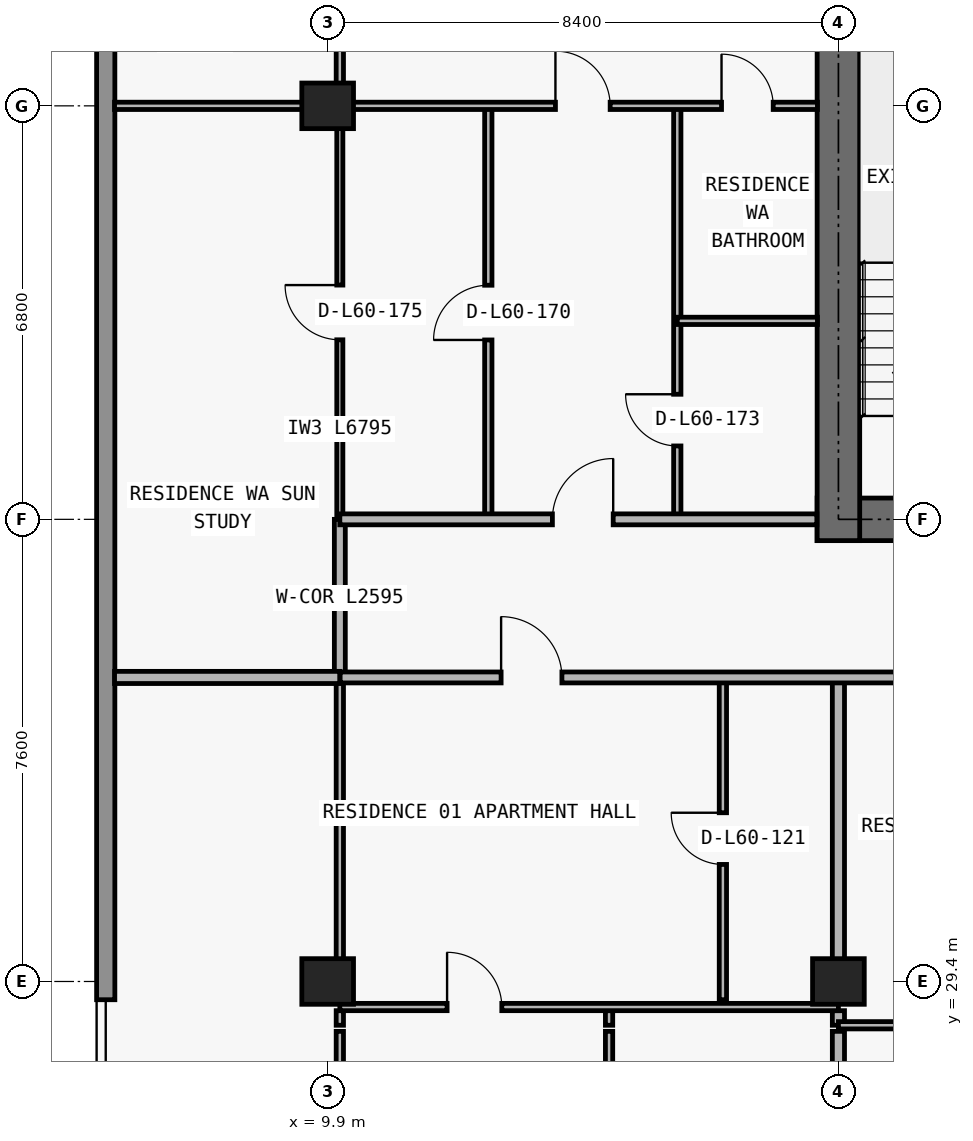
"""IFC4 building model, lengths in metres.
Left out: names, types, materials, properties, quantities, classifications, styles, units other than length and angle.
Written with IfcOpenShell. Run it as: python <this file> out.ifc"""

import sys

from ifc_helpers import new_model, si_unit, direction, frame, frame_2d, origin, origin_2d, place, context, subcontext, project, spatial, rectangle, extrude, element, fill, save


model = new_model("IFC4")
c1 = context("Model", 3, precision=1e-05, world=origin(), true_north=direction((0.0, 1.0)))
c2 = subcontext(c1, "Body", "Model", "MODEL_VIEW")
j1 = project(units=[si_unit("LENGTHUNIT", "METRE"), si_unit("PLANEANGLEUNIT", "RADIAN")], contexts=[c1])
p1 = place(None, origin())
s1 = spatial("IfcSite", under=j1, at=p1, CompositionType="ELEMENT")
p2 = place(p1, origin())
s2 = spatial("IfcBuilding", under=s1, at=p2, CompositionType="ELEMENT")
p3 = place(p2, frame((0.0, 0.0, 214.8)))
s3 = spatial("IfcBuildingStorey", under=s2, at=p3, CompositionType="ELEMENT", Elevation=214.8)
for number, where, z_axis, x_axis in (
    (1, (9.9, 29.4, 0.0), (0.0, 0.0, 1.0), (1.0, 0.0, 0.0)),
    (2, (18.3, 29.4, 0.0), (0.0, 0.0, 1.0), (1.0, 0.0, 0.0)),
    (3, (9.9, 43.8, 0.0), (0.0, 0.0, 1.0), (1.0, 0.0, 0.0)),
):
    element("IfcColumn", number, at=place(p3, frame(where, z_axis=z_axis, x_axis=x_axis)), inside=s3, PredefinedType="COLUMN", context=c2, shape_type="SweptSolid", body=[
        extrude(rectangle(XDim=0.85, YDim=0.75, at=origin_2d()), origin(), (0.0, 0.0, 1.0), 3.05),
    ])
p4 = place(p3, frame((17.95, 37.0, 0.0), z_axis=(0.0, 0.0, 1.0), x_axis=(1.0, 0.0, 0.0)))
e4 = element("IfcWall", 4, at=p4, inside=s3, PredefinedType="SHEAR", context=c2, shape_type="SweptSolid", body=[
    extrude(rectangle(XDim=41.9, YDim=0.7, at=frame_2d((20.95, 0.0))), origin(), (0.0, 0.0, 1.0), 3.05),
])
p5 = place(p4, frame((14.35, 0.0, 0.0)))
e5 = element("IfcOpeningElement", 5, at=p5, cuts=e4, PredefinedType="OPENING", context=c2, shape_type="SweptSolid", body=[
    extrude(rectangle(XDim=1.1, YDim=2.15, at=frame_2d((0.55, 1.075))), frame((0.0, 0.36, 0.0), z_axis=(0.0, -1.0, 0.0), x_axis=(1.0, 0.0, 0.0)), (0.0, 0.0, 1.0), 0.72),
])
p6 = place(p4, frame((6.2, 0.0, 0.0)))
e6 = element("IfcOpeningElement", 6, at=p6, cuts=e4, PredefinedType="OPENING", context=c2, shape_type="SweptSolid", body=[
    extrude(rectangle(XDim=1.05, YDim=2.15, at=frame_2d((0.525, 1.075))), frame((0.0, 0.36, 0.0), z_axis=(0.0, -1.0, 0.0), x_axis=(1.0, 0.0, 0.0)), (0.0, 0.0, 1.0), 0.72),
])
p7 = place(p4, frame((34.7, 0.0, 0.0)))
e7 = element("IfcOpeningElement", 7, at=p7, cuts=e4, PredefinedType="OPENING", context=c2, shape_type="SweptSolid", body=[
    extrude(rectangle(XDim=1.05, YDim=2.15, at=frame_2d((0.525, 1.075))), frame((0.0, 0.36, 0.0), z_axis=(0.0, -1.0, 0.0), x_axis=(1.0, 0.0, 0.0)), (0.0, 0.0, 1.0), 0.72),
])
p8 = place(p4, frame((10.812, 0.0, 0.0)))
e8 = element("IfcOpeningElement", 8, at=p8, cuts=e4, PredefinedType="OPENING", context=c2, shape_type="SweptSolid", body=[
    extrude(rectangle(XDim=1.05, YDim=2.15, at=frame_2d((0.525, 1.075))), frame((0.0, 0.36, 0.0), z_axis=(0.0, -1.0, 0.0), x_axis=(1.0, 0.0, 0.0)), (0.0, 0.0, 1.0), 0.72),
])
p9 = place(p4, frame((24.05, 0.0, 0.0)))
e9 = element("IfcOpeningElement", 9, at=p9, cuts=e4, PredefinedType="OPENING", context=c2, shape_type="SweptSolid", body=[
    extrude(rectangle(XDim=1.05, YDim=2.15, at=frame_2d((0.525, 1.075))), frame((0.0, 0.36, 0.0), z_axis=(0.0, -1.0, 0.0), x_axis=(1.0, 0.0, 0.0)), (0.0, 0.0, 1.0), 0.72),
])
p10 = place(p3, frame((18.3, 36.65, 0.0), z_axis=(0.0, 0.0, 1.0), x_axis=(0.0, 1.0, 0.0)))
e10 = element("IfcWall", 10, at=p10, inside=s3, PredefinedType="SHEAR", context=c2, shape_type="SweptSolid", body=[
    extrude(rectangle(XDim=13.95, YDim=0.7, at=frame_2d((6.975, 0.0))), origin(), (0.0, 0.0, 1.0), 3.05),
])
p11 = place(p3, frame((6.25, 29.1, 0.0), z_axis=(0.0, 0.0, 1.0), x_axis=(0.0, 1.0, 0.0)))
e11 = element("IfcWall", 11, at=p11, inside=s3, PredefinedType="STANDARD", context=c2, shape_type="SweptSolid", body=[
    extrude(rectangle(XDim=17.9, YDim=0.3, at=frame_2d((8.95, 0.0))), origin(), (0.0, 0.0, 1.0), 3.05),
])
p12 = place(p3, frame((10.1, 23.89, 0.0), z_axis=(0.0, 0.0, 1.0), x_axis=(0.0, 1.0, 0.0)))
e12 = element("IfcWall", 12, at=p12, inside=s3, PredefinedType="PARTITIONING", context=c2, shape_type="SweptSolid", body=[
    extrude(rectangle(XDim=4.69, YDim=0.12, at=frame_2d((2.345, 0.0))), origin(), (0.0, 0.0, 1.0), 2.263),
])
p13 = place(p12, frame((1.895, 0.0, 0.0)))
e13 = element("IfcOpeningElement", 13, at=p13, cuts=e12, PredefinedType="OPENING", context=c2, shape_type="SweptSolid", body=[
    extrude(rectangle(XDim=0.9, YDim=2.15, at=frame_2d((0.45, 1.075))), frame((0.0, 0.07, 0.0), z_axis=(0.0, -1.0, 0.0), x_axis=(1.0, 0.0, 0.0)), (0.0, 0.0, 1.0), 0.14),
])
p14 = place(p3, frame((10.1, 28.68, 0.0), z_axis=(0.0, 0.0, 1.0), x_axis=(0.0, 1.0, 0.0)))
e14 = element("IfcWall", 14, at=p14, inside=s3, PredefinedType="PARTITIONING", context=c2, shape_type="SweptSolid", body=[
    extrude(rectangle(XDim=0.24, YDim=0.12, at=frame_2d((0.12, 0.0))), origin(), (0.0, 0.0, 1.0), 2.263),
])
p15 = place(p3, frame((10.1, 29.1, 0.0), z_axis=(0.0, 0.0, 1.0), x_axis=(0.0, 1.0, 0.0)))
e15 = element("IfcWall", 15, at=p15, inside=s3, PredefinedType="PARTITIONING", context=c2, shape_type="SweptSolid", body=[
    extrude(rectangle(XDim=5.3, YDim=0.12, at=frame_2d((2.65, 0.0))), origin(), (0.0, 0.0, 1.0), 2.263),
])
p16 = place(p3, frame((10.1, 34.405, 0.0), z_axis=(0.0, 0.0, 1.0), x_axis=(0.0, 1.0, 0.0)))
e16 = element("IfcWall", 16, at=p16, inside=s3, PredefinedType="PARTITIONING", context=c2, shape_type="SweptSolid", body=[
    extrude(rectangle(XDim=2.595, YDim=0.18, at=frame_2d((1.297, 0.0))), origin(), (0.0, 0.0, 1.0), 2.263),
])
p17 = place(p3, frame((10.1, 37.005, 0.0), z_axis=(0.0, 0.0, 1.0), x_axis=(0.0, 1.0, 0.0)))
e17 = element("IfcWall", 17, at=p17, inside=s3, PredefinedType="MOVABLE", context=c2, shape_type="SweptSolid", body=[
    extrude(rectangle(XDim=6.795, YDim=0.1, at=frame_2d((3.397, 0.0))), origin(), (0.0, 0.0, 1.0), 2.263),
])
p18 = place(p17, frame((2.948, 0.0, 0.0)))
e18 = element("IfcOpeningElement", 18, at=p18, cuts=e17, PredefinedType="OPENING", context=c2, shape_type="SweptSolid", body=[
    extrude(rectangle(XDim=0.9, YDim=2.15, at=frame_2d((0.45, 1.075))), frame((0.0, 0.06, 0.0), z_axis=(0.0, -1.0, 0.0), x_axis=(1.0, 0.0, 0.0)), (0.0, 0.0, 1.0), 0.12),
])
p19 = place(p3, frame((10.1, 43.805, 0.0), z_axis=(0.0, 0.0, 1.0), x_axis=(0.0, 1.0, 0.0)))
e19 = element("IfcWall", 19, at=p19, inside=s3, PredefinedType="PARTITIONING", context=c2, shape_type="SweptSolid", body=[
    extrude(rectangle(XDim=3.075, YDim=0.12, at=frame_2d((1.538, 0.0))), origin(), (0.0, 0.0, 1.0), 3.05),
])
p20 = place(p19, frame((1.087, 0.0, 0.0)))
e20 = element("IfcOpeningElement", 20, at=p20, cuts=e19, PredefinedType="OPENING", context=c2, shape_type="SweptSolid", body=[
    extrude(rectangle(XDim=0.9, YDim=2.15, at=frame_2d((0.45, 1.075))), frame((0.0, 0.07, 0.0), z_axis=(0.0, -1.0, 0.0), x_axis=(1.0, 0.0, 0.0)), (0.0, 0.0, 1.0), 0.14),
])
p21 = place(p3, frame((12.542, 37.0, 0.0), z_axis=(0.0, 0.0, 1.0), x_axis=(0.0, 1.0, 0.0)))
e21 = element("IfcWall", 21, at=p21, inside=s3, PredefinedType="PARTITIONING", context=c2, shape_type="SweptSolid", body=[
    extrude(rectangle(XDim=6.8, YDim=0.12, at=frame_2d((3.4, 0.0))), origin(), (0.0, 0.0, 1.0), 2.578),
])
p22 = place(p21, frame((2.95, 0.0, 0.0)))
e22 = element("IfcOpeningElement", 22, at=p22, cuts=e21, PredefinedType="OPENING", context=c2, shape_type="SweptSolid", body=[
    extrude(rectangle(XDim=0.9, YDim=2.15, at=frame_2d((0.45, 1.075))), frame((0.0, 0.07, 0.0), z_axis=(0.0, -1.0, 0.0), x_axis=(1.0, 0.0, 0.0)), (0.0, 0.0, 1.0), 0.14),
])
p23 = place(p3, frame((14.528, 23.89, 0.0), z_axis=(0.0, 0.0, 1.0), x_axis=(0.0, 1.0, 0.0)))
e23 = element("IfcWall", 23, at=p23, inside=s3, PredefinedType="PARTITIONING", context=c2, shape_type="SweptSolid", body=[
    extrude(rectangle(XDim=4.69, YDim=0.12, at=frame_2d((2.345, 0.0))), origin(), (0.0, 0.0, 1.0), 3.05),
])
p24 = place(p23, frame((1.895, 0.0, 0.0)))
e24 = element("IfcOpeningElement", 24, at=p24, cuts=e23, PredefinedType="OPENING", context=c2, shape_type="SweptSolid", body=[
    extrude(rectangle(XDim=0.9, YDim=2.15, at=frame_2d((0.45, 1.075))), frame((0.0, 0.07, 0.0), z_axis=(0.0, -1.0, 0.0), x_axis=(1.0, 0.0, 0.0)), (0.0, 0.0, 1.0), 0.14),
])
p25 = place(p3, frame((14.528, 28.68, 0.0), z_axis=(0.0, 0.0, 1.0), x_axis=(0.0, 1.0, 0.0)))
e25 = element("IfcWall", 25, at=p25, inside=s3, PredefinedType="PARTITIONING", context=c2, shape_type="SweptSolid", body=[
    extrude(rectangle(XDim=0.24, YDim=0.12, at=frame_2d((0.12, 0.0))), origin(), (0.0, 0.0, 1.0), 3.05),
])
p26 = place(p3, frame((15.65, 37.0, 0.0), z_axis=(0.0, 0.0, 1.0), x_axis=(0.0, 1.0, 0.0)))
e26 = element("IfcWall", 26, at=p26, inside=s3, PredefinedType="PARTITIONING", context=c2, shape_type="SweptSolid", body=[
    extrude(rectangle(XDim=6.8, YDim=0.12, at=frame_2d((3.4, 0.0))), origin(), (0.0, 0.0, 1.0), 2.679),
])
p27 = place(p26, frame((1.207, 0.0, 0.0)))
e27 = element("IfcOpeningElement", 27, at=p27, cuts=e26, PredefinedType="OPENING", context=c2, shape_type="SweptSolid", body=[
    extrude(rectangle(XDim=0.85, YDim=2.1, at=frame_2d((0.425, 1.05))), frame((0.0, 0.07, 0.0), z_axis=(0.0, -1.0, 0.0), x_axis=(1.0, 0.0, 0.0)), (0.0, 0.0, 1.0), 0.14),
])
p28 = place(p3, frame((16.4, 29.1, 0.0), z_axis=(0.0, 0.0, 1.0), x_axis=(0.0, 1.0, 0.0)))
e28 = element("IfcWall", 28, at=p28, inside=s3, PredefinedType="PARTITIONING", context=c2, shape_type="SweptSolid", body=[
    extrude(rectangle(XDim=5.3, YDim=0.12, at=frame_2d((2.65, 0.0))), origin(), (0.0, 0.0, 1.0), 3.05),
])
p29 = place(p28, frame((2.225, 0.0, 0.0)))
e29 = element("IfcOpeningElement", 29, at=p29, cuts=e28, PredefinedType="OPENING", context=c2, shape_type="SweptSolid", body=[
    extrude(rectangle(XDim=0.85, YDim=2.1, at=frame_2d((0.425, 1.05))), frame((0.0, 0.07, 0.0), z_axis=(0.0, -1.0, 0.0), x_axis=(1.0, 0.0, 0.0)), (0.0, 0.0, 1.0), 0.14),
])
p30 = place(p3, frame((18.3, 23.89, 0.0), z_axis=(0.0, 0.0, 1.0), x_axis=(0.0, 1.0, 0.0)))
e30 = element("IfcWall", 30, at=p30, inside=s3, PredefinedType="PARTITIONING", context=c2, shape_type="SweptSolid", body=[
    extrude(rectangle(XDim=4.69, YDim=0.2, at=frame_2d((2.345, 0.0))), origin(), (0.0, 0.0, 1.0), 2.263),
])
p31 = place(p3, frame((18.3, 28.68, 0.0), z_axis=(0.0, 0.0, 1.0), x_axis=(0.0, 1.0, 0.0)))
e31 = element("IfcWall", 31, at=p31, inside=s3, PredefinedType="PARTITIONING", context=c2, shape_type="SweptSolid", body=[
    extrude(rectangle(XDim=0.24, YDim=0.2, at=frame_2d((0.12, 0.0))), origin(), (0.0, 0.0, 1.0), 2.263),
])
p32 = place(p3, frame((18.3, 29.1, 0.0), z_axis=(0.0, 0.0, 1.0), x_axis=(0.0, 1.0, 0.0)))
e32 = element("IfcWall", 32, at=p32, inside=s3, PredefinedType="PARTITIONING", context=c2, shape_type="SweptSolid", body=[
    extrude(rectangle(XDim=5.3, YDim=0.2, at=frame_2d((2.65, 0.0))), origin(), (0.0, 0.0, 1.0), 2.263),
])
p33 = place(p3, frame((18.3, 28.68, 0.0), z_axis=(0.0, 0.0, 1.0), x_axis=(1.0, 0.0, 0.0)))
e33 = element("IfcWall", 33, at=p33, inside=s3, PredefinedType="PARTITIONING", context=c2, shape_type="SweptSolid", body=[
    extrude(rectangle(XDim=8.18, YDim=0.12, at=frame_2d((4.09, 0.0))), origin(), (0.0, 0.0, 1.0), 3.05),
])
p34 = place(p33, frame((1.943, 0.0, 0.0)))
e34 = element("IfcOpeningElement", 34, at=p34, cuts=e33, PredefinedType="OPENING", context=c2, shape_type="SweptSolid", body=[
    extrude(rectangle(XDim=0.9, YDim=2.15, at=frame_2d((0.45, 1.075))), frame((0.0, 0.07, 0.0), z_axis=(0.0, -1.0, 0.0), x_axis=(1.0, 0.0, 0.0)), (0.0, 0.0, 1.0), 0.14),
])
p35 = place(p3, frame((10.1, 28.98, 0.0), z_axis=(0.0, 0.0, 1.0), x_axis=(1.0, 0.0, 0.0)))
e35 = element("IfcWall", 35, at=p35, inside=s3, PredefinedType="PARTITIONING", context=c2, shape_type="SweptSolid", body=[
    extrude(rectangle(XDim=8.2, YDim=0.12, at=frame_2d((4.1, 0.0))), origin(), (0.0, 0.0, 1.0), 3.05),
])
p36 = place(p35, frame((1.764, 0.0, 0.0)))
e36 = element("IfcOpeningElement", 36, at=p36, cuts=e35, PredefinedType="OPENING", context=c2, shape_type="SweptSolid", body=[
    extrude(rectangle(XDim=0.9, YDim=2.15, at=frame_2d((0.45, 1.075))), frame((0.0, 0.07, 0.0), z_axis=(0.0, -1.0, 0.0), x_axis=(1.0, 0.0, 0.0)), (0.0, 0.0, 1.0), 0.14),
])
p37 = place(p3, frame((6.395, 34.4, 0.0), z_axis=(0.0, 0.0, 1.0), x_axis=(1.0, 0.0, 0.0)))
e37 = element("IfcWall", 37, at=p37, inside=s3, PredefinedType="PARTITIONING", context=c2, shape_type="SweptSolid", body=[
    extrude(rectangle(XDim=3.705, YDim=0.2, at=frame_2d((1.853, 0.0))), origin(), (0.0, 0.0, 1.0), 3.05),
])
p38 = place(p3, frame((10.105, 34.4, 0.0), z_axis=(0.0, 0.0, 1.0), x_axis=(1.0, 0.0, 0.0)))
e38 = element("IfcWall", 38, at=p38, inside=s3, PredefinedType="PARTITIONING", context=c2, shape_type="SweptSolid", body=[
    extrude(rectangle(XDim=29.099, YDim=0.18, at=frame_2d((14.55, 0.0))), origin(), (0.0, 0.0, 1.0), 3.05),
])
p39 = place(p38, frame((2.647, 0.0, 0.0)))
e39 = element("IfcOpeningElement", 39, at=p39, cuts=e38, PredefinedType="OPENING", context=c2, shape_type="SweptSolid", body=[
    extrude(rectangle(XDim=1.0, YDim=2.2, at=frame_2d((0.5, 1.1))), frame((0.0, 0.1, 0.0), z_axis=(0.0, -1.0, 0.0), x_axis=(1.0, 0.0, 0.0)), (0.0, 0.0, 1.0), 0.2),
])
p40 = place(p38, frame((11.056, 0.0, 0.0)))
e40 = element("IfcOpeningElement", 40, at=p40, cuts=e38, PredefinedType="OPENING", context=c2, shape_type="SweptSolid", body=[
    extrude(rectangle(XDim=1.0, YDim=2.2, at=frame_2d((0.5, 1.1))), frame((0.0, 0.1, 0.0), z_axis=(0.0, -1.0, 0.0), x_axis=(1.0, 0.0, 0.0)), (0.0, 0.0, 1.0), 0.2),
])
p41 = place(p38, frame((19.334, 0.0, 0.0)))
e41 = element("IfcOpeningElement", 41, at=p41, cuts=e38, PredefinedType="OPENING", context=c2, shape_type="SweptSolid", body=[
    extrude(rectangle(XDim=1.0, YDim=2.2, at=frame_2d((0.5, 1.1))), frame((0.0, 0.1, 0.0), z_axis=(0.0, -1.0, 0.0), x_axis=(1.0, 0.0, 0.0)), (0.0, 0.0, 1.0), 0.2),
])
p42 = place(p38, frame((26.547, 0.0, 0.0)))
e42 = element("IfcOpeningElement", 42, at=p42, cuts=e38, PredefinedType="OPENING", context=c2, shape_type="SweptSolid", body=[
    extrude(rectangle(XDim=1.0, YDim=2.2, at=frame_2d((0.5, 1.1))), frame((0.0, 0.1, 0.0), z_axis=(0.0, -1.0, 0.0), x_axis=(1.0, 0.0, 0.0)), (0.0, 0.0, 1.0), 0.2),
])
p43 = place(p3, frame((10.1, 37.0, 0.0), z_axis=(0.0, 0.0, 1.0), x_axis=(1.0, 0.0, 0.0)))
e43 = element("IfcWall", 43, at=p43, inside=s3, PredefinedType="PARTITIONING", context=c2, shape_type="SweptSolid", body=[
    extrude(rectangle(XDim=7.845, YDim=0.18, at=frame_2d((3.922, 0.0))), origin(), (0.0, 0.0, 1.0), 3.05),
])
p44 = place(p43, frame((3.496, 0.0, 0.0)))
e44 = element("IfcOpeningElement", 44, at=p44, cuts=e43, PredefinedType="OPENING", context=c2, shape_type="SweptSolid", body=[
    extrude(rectangle(XDim=1.0, YDim=2.2, at=frame_2d((0.5, 1.1))), frame((0.0, 0.1, 0.0), z_axis=(0.0, -1.0, 0.0), x_axis=(1.0, 0.0, 0.0)), (0.0, 0.0, 1.0), 0.2),
])
p45 = place(p3, frame((15.65, 40.264, 0.0), z_axis=(0.0, 0.0, 1.0), x_axis=(1.0, 0.0, 0.0)))
e45 = element("IfcWall", 45, at=p45, inside=s3, PredefinedType="PARTITIONING", context=c2, shape_type="SweptSolid", body=[
    extrude(rectangle(XDim=2.305, YDim=0.12, at=frame_2d((1.153, 0.0))), origin(), (0.0, 0.0, 1.0), 3.05),
])
p46 = place(p3, frame((6.395, 43.8, 0.0), z_axis=(0.0, 0.0, 1.0), x_axis=(1.0, 0.0, 0.0)))
e46 = element("IfcWall", 46, at=p46, inside=s3, PredefinedType="PARTITIONING", context=c2, shape_type="SweptSolid", body=[
    extrude(rectangle(XDim=11.56, YDim=0.12, at=frame_2d((5.78, 0.0))), origin(), (0.0, 0.0, 1.0), 2.418),
])
p47 = place(p46, frame((7.251, 0.0, 0.0)))
e47 = element("IfcOpeningElement", 47, at=p47, cuts=e46, PredefinedType="OPENING", context=c2, shape_type="SweptSolid", body=[
    extrude(rectangle(XDim=0.9, YDim=2.15, at=frame_2d((0.45, 1.075))), frame((0.0, 0.07, 0.0), z_axis=(0.0, -1.0, 0.0), x_axis=(1.0, 0.0, 0.0)), (0.0, 0.0, 1.0), 0.14),
])
p48 = place(p46, frame((9.982, 0.0, 0.0)))
e48 = element("IfcOpeningElement", 48, at=p48, cuts=e46, PredefinedType="OPENING", context=c2, shape_type="SweptSolid", body=[
    extrude(rectangle(XDim=0.85, YDim=2.1, at=frame_2d((0.425, 1.05))), frame((0.0, 0.07, 0.0), z_axis=(0.0, -1.0, 0.0), x_axis=(1.0, 0.0, 0.0)), (0.0, 0.0, 1.0), 0.14),
])
p49 = place(p39, origin())
e49 = element("IfcDoor", 49, at=p49, inside=s3, OperationType="SINGLE_SWING_LEFT", PredefinedType="DOOR", context=c2, shape_type="SweptSolid", body=[
    extrude(rectangle(XDim=1.0, YDim=2.2, at=frame_2d((0.5, 1.1))), frame((0.0, 0.025, 0.0), z_axis=(0.0, -1.0, 0.0), x_axis=(1.0, 0.0, 0.0)), (0.0, 0.0, 1.0), 0.05),
])
fill(e39, e49)
p50 = place(p29, origin())
e50 = element("IfcDoor", 50, at=p50, inside=s3, OperationType="SINGLE_SWING_RIGHT", PredefinedType="DOOR", context=c2, shape_type="SweptSolid", body=[
    extrude(rectangle(XDim=0.85, YDim=2.1, at=frame_2d((0.425, 1.05))), frame((0.0, 0.025, 0.0), z_axis=(0.0, -1.0, 0.0), x_axis=(1.0, 0.0, 0.0)), (0.0, 0.0, 1.0), 0.05),
])
fill(e29, e50)
p51 = place(p36, origin())
e51 = element("IfcDoor", 51, at=p51, inside=s3, OperationType="SINGLE_SWING_LEFT", PredefinedType="DOOR", context=c2, shape_type="SweptSolid", body=[
    extrude(rectangle(XDim=0.9, YDim=2.15, at=frame_2d((0.45, 1.075))), frame((0.0, 0.025, 0.0), z_axis=(0.0, -1.0, 0.0), x_axis=(1.0, 0.0, 0.0)), (0.0, 0.0, 1.0), 0.05),
])
fill(e36, e51)
p52 = place(p22, origin())
e52 = element("IfcDoor", 52, at=p52, inside=s3, OperationType="SINGLE_SWING_LEFT", PredefinedType="DOOR", context=c2, shape_type="SweptSolid", body=[
    extrude(rectangle(XDim=0.9, YDim=2.15, at=frame_2d((0.45, 1.075))), frame((0.0, 0.025, 0.0), z_axis=(0.0, -1.0, 0.0), x_axis=(1.0, 0.0, 0.0)), (0.0, 0.0, 1.0), 0.05),
])
fill(e22, e52)
p53 = place(p44, origin())
e53 = element("IfcDoor", 53, at=p53, inside=s3, OperationType="SINGLE_SWING_RIGHT", PredefinedType="DOOR", context=c2, shape_type="SweptSolid", body=[
    extrude(rectangle(XDim=1.0, YDim=2.2, at=frame_2d((0.5, 1.1))), frame((0.0, 0.025, 0.0), z_axis=(0.0, -1.0, 0.0), x_axis=(1.0, 0.0, 0.0)), (0.0, 0.0, 1.0), 0.05),
])
fill(e44, e53)
p54 = place(p47, origin())
e54 = element("IfcDoor", 54, at=p54, inside=s3, OperationType="SINGLE_SWING_LEFT", PredefinedType="DOOR", context=c2, shape_type="SweptSolid", body=[
    extrude(rectangle(XDim=0.9, YDim=2.15, at=frame_2d((0.45, 1.075))), frame((0.0, 0.025, 0.0), z_axis=(0.0, -1.0, 0.0), x_axis=(1.0, 0.0, 0.0)), (0.0, 0.0, 1.0), 0.05),
])
fill(e47, e54)
p55 = place(p27, origin())
e55 = element("IfcDoor", 55, at=p55, inside=s3, OperationType="SINGLE_SWING_RIGHT", PredefinedType="DOOR", context=c2, shape_type="SweptSolid", body=[
    extrude(rectangle(XDim=0.85, YDim=2.1, at=frame_2d((0.425, 1.05))), frame((0.0, 0.025, 0.0), z_axis=(0.0, -1.0, 0.0), x_axis=(1.0, 0.0, 0.0)), (0.0, 0.0, 1.0), 0.05),
])
fill(e27, e55)
p56 = place(p48, origin())
e56 = element("IfcDoor", 56, at=p56, inside=s3, OperationType="SINGLE_SWING_LEFT", PredefinedType="DOOR", context=c2, shape_type="SweptSolid", body=[
    extrude(rectangle(XDim=0.85, YDim=2.1, at=frame_2d((0.425, 1.05))), frame((0.0, 0.025, 0.0), z_axis=(0.0, -1.0, 0.0), x_axis=(1.0, 0.0, 0.0)), (0.0, 0.0, 1.0), 0.05),
])
fill(e48, e56)
p57 = place(p18, origin())
e57 = element("IfcDoor", 57, at=p57, inside=s3, OperationType="SINGLE_SWING_RIGHT", PredefinedType="DOOR", context=c2, shape_type="SweptSolid", body=[
    extrude(rectangle(XDim=0.9, YDim=2.15, at=frame_2d((0.45, 1.075))), frame((0.0, 0.025, 0.0), z_axis=(0.0, -1.0, 0.0), x_axis=(1.0, 0.0, 0.0)), (0.0, 0.0, 1.0), 0.05),
])
fill(e18, e57)
save(model, sys.argv[1])
